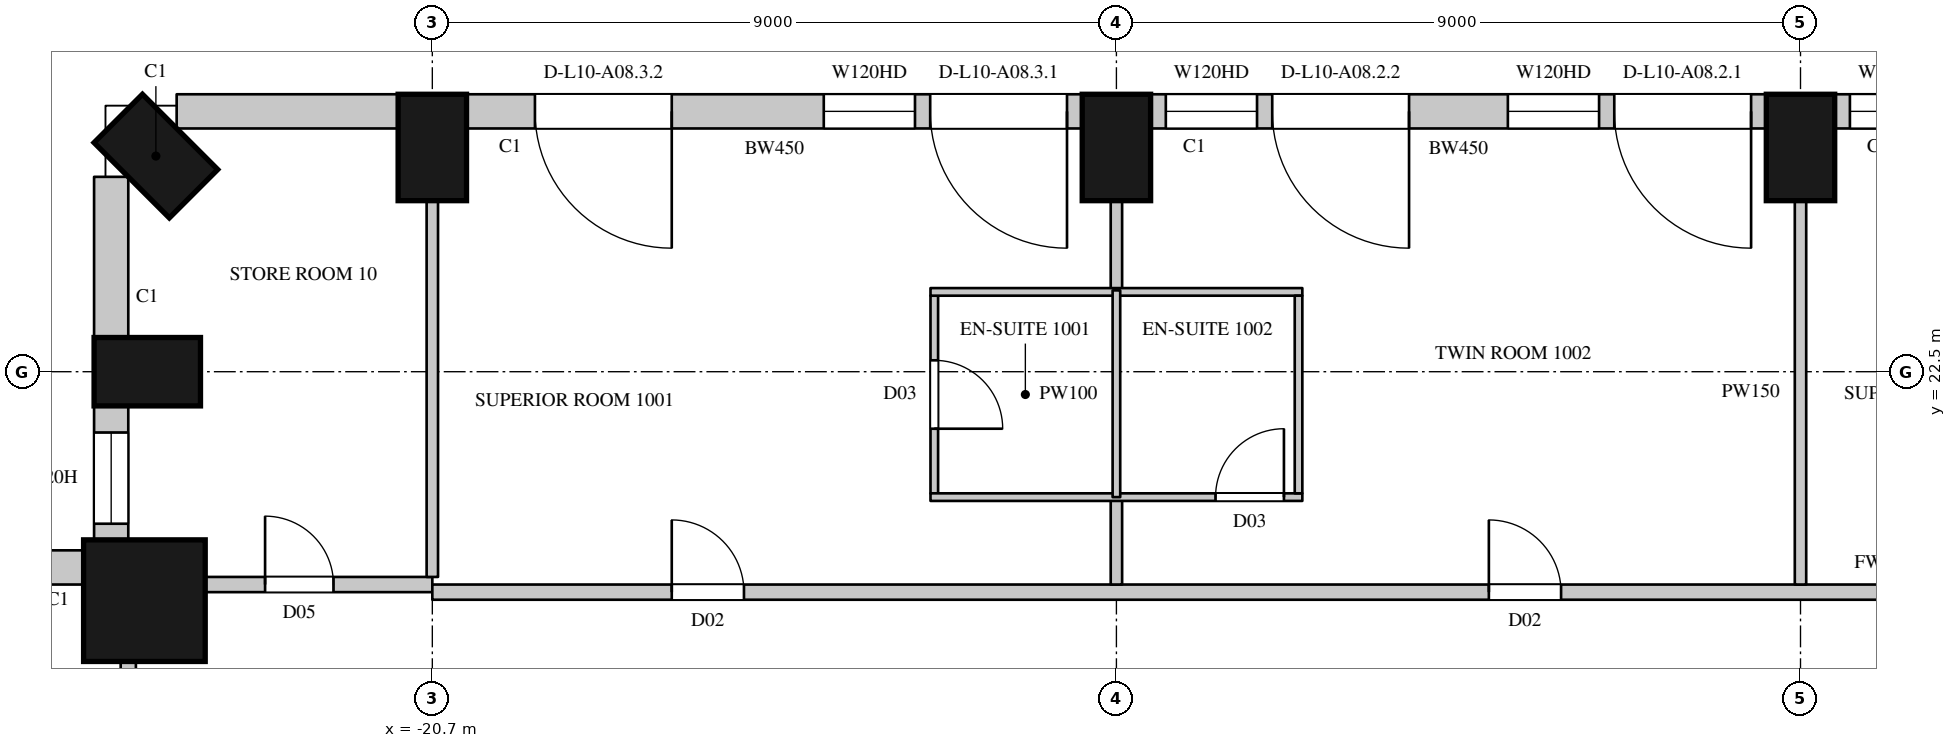
"""IFC4 building model, lengths in metres.
Left out: names, types, materials, properties, quantities, classifications, styles, units other than length and angle.
Written with IfcOpenShell. Run it as: python <this file> out.ifc"""

import sys

from ifc_helpers import new_model, si_unit, direction, frame, frame_2d, origin, origin_2d, place, context, subcontext, project, spatial, rectangle, circle, extrude, element, fill, save


model = new_model("IFC4")
c1 = context("Model", 3, precision=1e-05, world=origin(), true_north=direction((0.0, 1.0)))
c2 = subcontext(c1, "Body", "Model", "MODEL_VIEW")
j1 = project(units=[si_unit("LENGTHUNIT", "METRE"), si_unit("PLANEANGLEUNIT", "RADIAN")], contexts=[c1])
p1 = place(None, origin())
s1 = spatial("IfcSite", under=j1, at=p1, CompositionType="ELEMENT")
p2 = place(p1, origin())
s2 = spatial("IfcBuilding", under=s1, at=p2, CompositionType="ELEMENT")
p3 = place(p2, frame((0.0, 0.0, 66.3)))
s3 = spatial("IfcBuildingStorey", under=s2, at=p3, CompositionType="ELEMENT", Elevation=66.3)
for number, where, z_axis, x_axis in (
    (1, (-2.7, 25.45, 0.0), (0.0, 0.0, 1.0), (-1.0, 0.0, 0.0)),
    (2, (-11.7, 25.45, 0.0), (0.0, 0.0, 1.0), (-1.0, 0.0, 0.0)),
    (3, (-20.7, 25.45, 0.0), (0.0, 0.0, 1.0), (-1.0, 0.0, 0.0)),
    (4, (-24.337, 25.337, 0.0), (0.0, 0.0, 1.0), (-0.707, -0.707, 0.0)),
    (5, (-24.45, 22.5, 0.0), (0.0, 0.0, 1.0), (0.0, -1.0, 0.0)),
):
    element("IfcColumn", number, at=place(p3, frame(where, z_axis=z_axis, x_axis=x_axis)), inside=s3, PredefinedType="COLUMN", context=c2, shape_type="SweptSolid", body=[
        extrude(rectangle(XDim=0.9, YDim=1.4, at=origin_2d()), origin(), (0.0, 0.0, 1.0), 3.6),
    ])
p4 = place(p3, frame((-24.488, 19.488, 0.0), z_axis=(0.0, 0.0, 1.0), x_axis=(1.0, 0.0, 0.0)))
e6 = element("IfcColumn", 6, at=p4, inside=s3, PredefinedType="COLUMN", context=c2, shape_type="SweptSolid", body=[
    extrude(circle(Radius=0.8, at=origin_2d()), origin(), (0.0, 0.0, 1.0), 3.6),
])
p5 = place(p3, frame((5.85, 25.925, 0.0), z_axis=(0.0, 0.0, 1.0), x_axis=(-1.0, 0.0, 0.0)))
e7 = element("IfcWall", 7, at=p5, inside=s3, PredefinedType="SOLIDWALL", context=c2, shape_type="SweptSolid", body=[
    extrude(rectangle(XDim=8.1, YDim=0.45, at=frame_2d((4.05, 0.0))), origin(), (0.0, 0.0, 1.0), 3.3),
])
p6 = place(p5, frame((0.2, 0.0, 0.0)))
e8 = element("IfcOpeningElement", 8, at=p6, cuts=e7, PredefinedType="OPENING", context=c2, shape_type="SweptSolid", body=[
    extrude(rectangle(XDim=1.8, YDim=2.4, at=frame_2d((0.9, 1.2))), frame((0.0, 0.235, 0.0), z_axis=(0.0, -1.0, 0.0), x_axis=(1.0, 0.0, 0.0)), (0.0, 0.0, 1.0), 0.47),
])
p7 = place(p5, frame((2.2, 0.0, 1.05)))
e9 = element("IfcOpeningElement", 9, at=p7, cuts=e7, PredefinedType="OPENING", context=c2, shape_type="SweptSolid", body=[
    extrude(rectangle(XDim=1.2, YDim=2.0, at=frame_2d((0.6, 1.0))), frame((0.0, 0.235, 0.0), z_axis=(0.0, -1.0, 0.0), x_axis=(1.0, 0.0, 0.0)), (0.0, 0.0, 1.0), 0.47),
])
p8 = place(p5, frame((4.7, 0.0, 0.0)))
e10 = element("IfcOpeningElement", 10, at=p8, cuts=e7, PredefinedType="OPENING", context=c2, shape_type="SweptSolid", body=[
    extrude(rectangle(XDim=1.8, YDim=2.4, at=frame_2d((0.9, 1.2))), frame((0.0, 0.235, 0.0), z_axis=(0.0, -1.0, 0.0), x_axis=(1.0, 0.0, 0.0)), (0.0, 0.0, 1.0), 0.47),
])
p9 = place(p5, frame((6.7, 0.0, 1.05)))
e11 = element("IfcOpeningElement", 11, at=p9, cuts=e7, PredefinedType="OPENING", context=c2, shape_type="SweptSolid", body=[
    extrude(rectangle(XDim=1.2, YDim=2.0, at=frame_2d((0.6, 1.0))), frame((0.0, 0.235, 0.0), z_axis=(0.0, -1.0, 0.0), x_axis=(1.0, 0.0, 0.0)), (0.0, 0.0, 1.0), 0.47),
])
p10 = place(p3, frame((-3.15, 25.925, 0.0), z_axis=(0.0, 0.0, 1.0), x_axis=(-1.0, 0.0, 0.0)))
e12 = element("IfcWall", 12, at=p10, inside=s3, PredefinedType="SOLIDWALL", context=c2, shape_type="SweptSolid", body=[
    extrude(rectangle(XDim=8.1, YDim=0.45, at=frame_2d((4.05, 0.0))), origin(), (0.0, 0.0, 1.0), 3.3),
])
p11 = place(p10, frame((0.2, 0.0, 0.0)))
e13 = element("IfcOpeningElement", 13, at=p11, cuts=e12, PredefinedType="OPENING", context=c2, shape_type="SweptSolid", body=[
    extrude(rectangle(XDim=1.8, YDim=2.4, at=frame_2d((0.9, 1.2))), frame((0.0, 0.235, 0.0), z_axis=(0.0, -1.0, 0.0), x_axis=(1.0, 0.0, 0.0)), (0.0, 0.0, 1.0), 0.47),
])
p12 = place(p10, frame((2.2, 0.0, 1.05)))
e14 = element("IfcOpeningElement", 14, at=p12, cuts=e12, PredefinedType="OPENING", context=c2, shape_type="SweptSolid", body=[
    extrude(rectangle(XDim=1.2, YDim=2.0, at=frame_2d((0.6, 1.0))), frame((0.0, 0.235, 0.0), z_axis=(0.0, -1.0, 0.0), x_axis=(1.0, 0.0, 0.0)), (0.0, 0.0, 1.0), 0.47),
])
p13 = place(p10, frame((4.7, 0.0, 0.0)))
e15 = element("IfcOpeningElement", 15, at=p13, cuts=e12, PredefinedType="OPENING", context=c2, shape_type="SweptSolid", body=[
    extrude(rectangle(XDim=1.8, YDim=2.4, at=frame_2d((0.9, 1.2))), frame((0.0, 0.235, 0.0), z_axis=(0.0, -1.0, 0.0), x_axis=(1.0, 0.0, 0.0)), (0.0, 0.0, 1.0), 0.47),
])
p14 = place(p10, frame((6.7, 0.0, 1.05)))
e16 = element("IfcOpeningElement", 16, at=p14, cuts=e12, PredefinedType="OPENING", context=c2, shape_type="SweptSolid", body=[
    extrude(rectangle(XDim=1.2, YDim=2.0, at=frame_2d((0.6, 1.0))), frame((0.0, 0.235, 0.0), z_axis=(0.0, -1.0, 0.0), x_axis=(1.0, 0.0, 0.0)), (0.0, 0.0, 1.0), 0.47),
])
p15 = place(p3, frame((-12.15, 25.925, 0.0), z_axis=(0.0, 0.0, 1.0), x_axis=(-1.0, 0.0, 0.0)))
e17 = element("IfcWall", 17, at=p15, inside=s3, PredefinedType="SOLIDWALL", context=c2, shape_type="SweptSolid", body=[
    extrude(rectangle(XDim=8.1, YDim=0.45, at=frame_2d((4.05, 0.0))), origin(), (0.0, 0.0, 1.0), 3.3),
])
p16 = place(p15, frame((0.2, 0.0, 0.0)))
e18 = element("IfcOpeningElement", 18, at=p16, cuts=e17, PredefinedType="OPENING", context=c2, shape_type="SweptSolid", body=[
    extrude(rectangle(XDim=1.8, YDim=2.4, at=frame_2d((0.9, 1.2))), frame((0.0, 0.235, 0.0), z_axis=(0.0, -1.0, 0.0), x_axis=(1.0, 0.0, 0.0)), (0.0, 0.0, 1.0), 0.47),
])
p17 = place(p15, frame((2.2, 0.0, 1.05)))
e19 = element("IfcOpeningElement", 19, at=p17, cuts=e17, PredefinedType="OPENING", context=c2, shape_type="SweptSolid", body=[
    extrude(rectangle(XDim=1.2, YDim=2.0, at=frame_2d((0.6, 1.0))), frame((0.0, 0.235, 0.0), z_axis=(0.0, -1.0, 0.0), x_axis=(1.0, 0.0, 0.0)), (0.0, 0.0, 1.0), 0.47),
])
p18 = place(p15, frame((5.4, 0.0, 0.0)))
e20 = element("IfcOpeningElement", 20, at=p18, cuts=e17, PredefinedType="OPENING", context=c2, shape_type="SweptSolid", body=[
    extrude(rectangle(XDim=1.8, YDim=2.4, at=frame_2d((0.9, 1.2))), frame((0.0, 0.235, 0.0), z_axis=(0.0, -1.0, 0.0), x_axis=(1.0, 0.0, 0.0)), (0.0, 0.0, 1.0), 0.47),
])
p19 = place(p3, frame((-21.15, 25.925, 0.0), z_axis=(0.0, 0.0, 1.0), x_axis=(-1.0, 0.0, 0.0)))
e21 = element("IfcWall", 21, at=p19, inside=s3, PredefinedType="SOLIDWALL", context=c2, shape_type="SweptSolid", body=[
    extrude(rectangle(XDim=2.914, YDim=0.45, at=frame_2d((1.457, 0.0))), origin(), (0.0, 0.0, 1.0), 3.3),
])
p20 = place(p3, frame((-24.925, 25.064, 0.0), z_axis=(0.0, 0.0, 1.0), x_axis=(0.0, -1.0, 0.0)))
e22 = element("IfcWall", 22, at=p20, inside=s3, PredefinedType="SOLIDWALL", context=c2, shape_type="SweptSolid", body=[
    extrude(rectangle(XDim=2.114, YDim=0.45, at=frame_2d((1.057, 0.0))), origin(), (0.0, 0.0, 1.0), 3.3),
])
p21 = place(p3, frame((-24.925, 22.05, 0.0), z_axis=(0.0, 0.0, 1.0), x_axis=(0.0, -1.0, 0.0)))
e23 = element("IfcWall", 23, at=p21, inside=s3, PredefinedType="SOLIDWALL", context=c2, shape_type="SweptSolid", body=[
    extrude(rectangle(XDim=1.792, YDim=0.45, at=frame_2d((0.896, 0.0))), origin(), (0.0, 0.0, 1.0), 3.3),
])
p22 = place(p21, frame((0.35, 0.0, 1.05)))
e24 = element("IfcOpeningElement", 24, at=p22, cuts=e23, PredefinedType="OPENING", context=c2, shape_type="SweptSolid", body=[
    extrude(rectangle(XDim=1.2, YDim=2.0, at=frame_2d((0.6, 1.0))), frame((0.0, 0.235, 0.0), z_axis=(0.0, -1.0, 0.0), x_axis=(1.0, 0.0, 0.0)), (0.0, 0.0, 1.0), 0.47),
])
p23 = place(p3, frame((-25.259, 19.925, 0.0), z_axis=(0.0, 0.0, 1.0), x_axis=(-1.0, 0.0, 0.0)))
e25 = element("IfcWall", 25, at=p23, inside=s3, PredefinedType="SOLIDWALL", context=c2, shape_type="SweptSolid", body=[
    extrude(rectangle(XDim=3.805, YDim=0.45, at=frame_2d((1.903, 0.0))), origin(), (0.0, 0.0, 1.0), 3.3),
])
p24 = place(p23, frame((0.592, 0.0, 1.05)))
e26 = element("IfcOpeningElement", 26, at=p24, cuts=e25, PredefinedType="OPENING", context=c2, shape_type="SweptSolid", body=[
    extrude(rectangle(XDim=2.7, YDim=2.0, at=frame_2d((1.35, 1.0))), frame((0.0, 0.235, 0.0), z_axis=(0.0, -1.0, 0.0), x_axis=(1.0, 0.0, 0.0)), (0.0, 0.0, 1.0), 0.47),
])
p25 = place(p3, frame((-24.7, 16.03, 0.0), z_axis=(0.0, 0.0, 1.0), x_axis=(0.0, 1.0, 0.0)))
e27 = element("IfcWall", 27, at=p25, inside=s3, PredefinedType="PARTITIONING", context=c2, shape_type="SweptSolid", body=[
    extrude(rectangle(XDim=2.67, YDim=0.2, at=frame_2d((1.335, 0.0))), origin(), (0.0, 0.0, 1.0), 3.3),
])
p26 = place(p25, frame((0.45, 0.0, 0.0)))
e28 = element("IfcOpeningElement", 28, at=p26, cuts=e27, PredefinedType="OPENING", context=c2, shape_type="SweptSolid", body=[
    extrude(rectangle(XDim=1.6, YDim=2.4, at=frame_2d((0.8, 1.2))), frame((0.0, 0.11, 0.0), z_axis=(0.0, -1.0, 0.0), x_axis=(1.0, 0.0, 0.0)), (0.0, 0.0, 1.0), 0.22),
])
p27 = place(p3, frame((-23.7, 19.7, 0.0), z_axis=(0.0, 0.0, 1.0), x_axis=(1.0, 0.0, 0.0)))
e29 = element("IfcWall", 29, at=p27, inside=s3, PredefinedType="PARTITIONING", context=c2, shape_type="SweptSolid", body=[
    extrude(rectangle(XDim=3.0, YDim=0.2, at=frame_2d((1.5, 0.0))), origin(), (0.0, 0.0, 1.0), 3.3),
])
p28 = place(p27, frame((0.8, 0.0, 0.0)))
e30 = element("IfcOpeningElement", 30, at=p28, cuts=e29, PredefinedType="OPENING", context=c2, shape_type="SweptSolid", body=[
    extrude(rectangle(XDim=0.9, YDim=2.2, at=frame_2d((0.45, 1.1))), frame((0.0, 0.11, 0.0), z_axis=(0.0, -1.0, 0.0), x_axis=(1.0, 0.0, 0.0)), (0.0, 0.0, 1.0), 0.22),
])
p29 = place(p3, frame((-20.7, 19.6, 0.0), z_axis=(0.0, 0.0, 1.0), x_axis=(1.0, 0.0, 0.0)))
e31 = element("IfcWall", 31, at=p29, inside=s3, PredefinedType="PARTITIONING", context=c2, shape_type="SweptSolid", body=[
    extrude(rectangle(XDim=38.184, YDim=0.2, at=frame_2d((19.092, 0.0))), origin(), (0.0, 0.0, 1.0), 3.3),
])
p30 = place(p29, frame((3.15, 0.0, 0.0)))
e32 = element("IfcOpeningElement", 32, at=p30, cuts=e31, PredefinedType="OPENING", context=c2, shape_type="SweptSolid", body=[
    extrude(rectangle(XDim=0.95, YDim=2.2, at=frame_2d((0.475, 1.1))), frame((0.0, 0.11, 0.0), z_axis=(0.0, -1.0, 0.0), x_axis=(1.0, 0.0, 0.0)), (0.0, 0.0, 1.0), 0.22),
])
p31 = place(p29, frame((13.9, 0.0, 0.0)))
e33 = element("IfcOpeningElement", 33, at=p31, cuts=e31, PredefinedType="OPENING", context=c2, shape_type="SweptSolid", body=[
    extrude(rectangle(XDim=0.95, YDim=2.2, at=frame_2d((0.475, 1.1))), frame((0.0, 0.11, 0.0), z_axis=(0.0, -1.0, 0.0), x_axis=(1.0, 0.0, 0.0)), (0.0, 0.0, 1.0), 0.22),
])
p32 = place(p29, frame((21.15, 0.0, 0.0)))
e34 = element("IfcOpeningElement", 34, at=p32, cuts=e31, PredefinedType="OPENING", context=c2, shape_type="SweptSolid", body=[
    extrude(rectangle(XDim=0.95, YDim=2.2, at=frame_2d((0.475, 1.1))), frame((0.0, 0.11, 0.0), z_axis=(0.0, -1.0, 0.0), x_axis=(1.0, 0.0, 0.0)), (0.0, 0.0, 1.0), 0.22),
])
p33 = place(p29, frame((31.9, 0.0, 0.0)))
e35 = element("IfcOpeningElement", 35, at=p33, cuts=e31, PredefinedType="OPENING", context=c2, shape_type="SweptSolid", body=[
    extrude(rectangle(XDim=0.95, YDim=2.2, at=frame_2d((0.475, 1.1))), frame((0.0, 0.11, 0.0), z_axis=(0.0, -1.0, 0.0), x_axis=(1.0, 0.0, 0.0)), (0.0, 0.0, 1.0), 0.22),
])
p34 = place(p29, frame((36.85, 0.0, 0.0)))
e36 = element("IfcOpeningElement", 36, at=p34, cuts=e31, PredefinedType="OPENING", context=c2, shape_type="SweptSolid", body=[
    extrude(rectangle(XDim=0.95, YDim=2.2, at=frame_2d((0.475, 1.1))), frame((0.0, 0.11, 0.0), z_axis=(0.0, -1.0, 0.0), x_axis=(1.0, 0.0, 0.0)), (0.0, 0.0, 1.0), 0.22),
])
p35 = place(p3, frame((-20.7, 19.8, 0.0), z_axis=(0.0, 0.0, 1.0), x_axis=(0.0, 1.0, 0.0)))
e37 = element("IfcWall", 37, at=p35, inside=s3, PredefinedType="PARTITIONING", context=c2, shape_type="SweptSolid", body=[
    extrude(rectangle(XDim=4.95, YDim=0.15, at=frame_2d((2.475, 0.0))), origin(), (0.0, 0.0, 1.0), 2.75),
])
p36 = place(p3, frame((-11.7, 19.7, 0.0), z_axis=(0.0, 0.0, 1.0), x_axis=(0.0, 1.0, 0.0)))
e38 = element("IfcWall", 38, at=p36, inside=s3, PredefinedType="PARTITIONING", context=c2, shape_type="SweptSolid", body=[
    extrude(rectangle(XDim=1.15, YDim=0.15, at=frame_2d((0.575, 0.0))), origin(), (0.0, 0.0, 1.0), 2.75),
])
p37 = place(p3, frame((-11.7, 23.57, 0.0), z_axis=(0.0, 0.0, 1.0), x_axis=(0.0, 1.0, 0.0)))
e39 = element("IfcWall", 39, at=p37, inside=s3, PredefinedType="PARTITIONING", context=c2, shape_type="SweptSolid", body=[
    extrude(rectangle(XDim=1.18, YDim=0.15, at=frame_2d((0.59, 0.0))), origin(), (0.0, 0.0, 1.0), 2.75),
])
p38 = place(p3, frame((-2.7, 19.7, 0.0), z_axis=(0.0, 0.0, 1.0), x_axis=(0.0, 1.0, 0.0)))
e40 = element("IfcWall", 40, at=p38, inside=s3, PredefinedType="PARTITIONING", context=c2, shape_type="SweptSolid", body=[
    extrude(rectangle(XDim=5.05, YDim=0.15, at=frame_2d((2.525, 0.0))), origin(), (0.0, 0.0, 1.0), 2.75),
])
p39 = place(p3, frame((-14.096, 20.9, 0.0), z_axis=(0.0, 0.0, 1.0), x_axis=(0.0, 1.0, 0.0)))
e41 = element("IfcWall", 41, at=p39, inside=s3, PredefinedType="PARTITIONING", context=c2, shape_type="SweptSolid", body=[
    extrude(rectangle(XDim=2.6, YDim=0.1, at=frame_2d((1.3, 0.0))), origin(), (0.0, 0.0, 1.0), 3.3),
])
p40 = place(p39, frame((0.85, 0.0, 0.0)))
e42 = element("IfcOpeningElement", 42, at=p40, cuts=e41, PredefinedType="OPENING", context=c2, shape_type="SweptSolid", body=[
    extrude(rectangle(XDim=0.9, YDim=2.2, at=frame_2d((0.45, 1.1))), frame((0.0, 0.06, 0.0), z_axis=(0.0, -1.0, 0.0), x_axis=(1.0, 0.0, 0.0)), (0.0, 0.0, 1.0), 0.12),
])
p41 = place(p3, frame((-14.146, 20.85, 0.0), z_axis=(0.0, 0.0, 1.0), x_axis=(1.0, 0.0, 0.0)))
e43 = element("IfcWall", 43, at=p41, inside=s3, PredefinedType="PARTITIONING", context=c2, shape_type="SweptSolid", body=[
    extrude(rectangle(XDim=4.892, YDim=0.1, at=frame_2d((2.446, 0.0))), origin(), (0.0, 0.0, 1.0), 3.3),
])
p42 = place(p41, frame((3.75, 0.0, 0.0)))
e44 = element("IfcOpeningElement", 44, at=p42, cuts=e43, PredefinedType="OPENING", context=c2, shape_type="SweptSolid", body=[
    extrude(rectangle(XDim=0.9, YDim=2.2, at=frame_2d((0.45, 1.1))), frame((0.0, 0.06, 0.0), z_axis=(0.0, -1.0, 0.0), x_axis=(1.0, 0.0, 0.0)), (0.0, 0.0, 1.0), 0.12),
])
p43 = place(p3, frame((-14.146, 23.55, 0.0), z_axis=(0.0, 0.0, 1.0), x_axis=(1.0, 0.0, 0.0)))
e45 = element("IfcWall", 45, at=p43, inside=s3, PredefinedType="PARTITIONING", context=c2, shape_type="SweptSolid", body=[
    extrude(rectangle(XDim=4.892, YDim=0.1, at=frame_2d((2.446, 0.0))), origin(), (0.0, 0.0, 1.0), 3.3),
])
p44 = place(p3, frame((-11.7, 20.85, 0.0), z_axis=(0.0, 0.0, 1.0), x_axis=(0.0, 1.0, 0.0)))
e46 = element("IfcWall", 46, at=p44, inside=s3, PredefinedType="PARTITIONING", context=c2, shape_type="SweptSolid", body=[
    extrude(rectangle(XDim=2.72, YDim=0.1, at=frame_2d((1.36, 0.0))), origin(), (0.0, 0.0, 1.0), 2.75),
])
p45 = place(p3, frame((-9.304, 20.9, 0.0), z_axis=(0.0, 0.0, 1.0), x_axis=(0.0, 1.0, 0.0)))
e47 = element("IfcWall", 47, at=p45, inside=s3, PredefinedType="PARTITIONING", context=c2, shape_type="SweptSolid", body=[
    extrude(rectangle(XDim=2.6, YDim=0.1, at=frame_2d((1.3, 0.0))), origin(), (0.0, 0.0, 1.0), 3.3),
])
p46 = place(p9, origin())
e48 = element("IfcWindow", 48, at=p46, inside=s3, PartitioningType="SINGLE_PANEL", PredefinedType="WINDOW", context=c2, shape_type="SweptSolid", body=[
    extrude(rectangle(XDim=1.2, YDim=2.0, at=frame_2d((0.6, 1.0))), frame((0.0, 0.135, 0.0), z_axis=(0.0, -1.0, 0.0), x_axis=(1.0, 0.0, 0.0)), (0.0, 0.0, 1.0), 0.06),
])
fill(e11, e48)
p47 = place(p11, origin())
e49 = element("IfcDoor", 49, at=p47, inside=s3, OperationType="SLIDING_TO_LEFT", PredefinedType="DOOR", context=c2, shape_type="SweptSolid", body=[
    extrude(rectangle(XDim=1.8, YDim=2.4, at=frame_2d((0.9, 1.2))), frame((0.0, 0.13, 0.0), z_axis=(0.0, -1.0, 0.0), x_axis=(1.0, 0.0, 0.0)), (0.0, 0.0, 1.0), 0.05),
])
fill(e13, e49)
p48 = place(p12, origin())
e50 = element("IfcWindow", 50, at=p48, inside=s3, PartitioningType="SINGLE_PANEL", PredefinedType="WINDOW", context=c2, shape_type="SweptSolid", body=[
    extrude(rectangle(XDim=1.2, YDim=2.0, at=frame_2d((0.6, 1.0))), frame((0.0, 0.135, 0.0), z_axis=(0.0, -1.0, 0.0), x_axis=(1.0, 0.0, 0.0)), (0.0, 0.0, 1.0), 0.06),
])
fill(e14, e50)
p49 = place(p13, origin())
e51 = element("IfcDoor", 51, at=p49, inside=s3, OperationType="SLIDING_TO_LEFT", PredefinedType="DOOR", context=c2, shape_type="SweptSolid", body=[
    extrude(rectangle(XDim=1.8, YDim=2.4, at=frame_2d((0.9, 1.2))), frame((0.0, 0.13, 0.0), z_axis=(0.0, -1.0, 0.0), x_axis=(1.0, 0.0, 0.0)), (0.0, 0.0, 1.0), 0.05),
])
fill(e15, e51)
p50 = place(p14, origin())
e52 = element("IfcWindow", 52, at=p50, inside=s3, PartitioningType="SINGLE_PANEL", PredefinedType="WINDOW", context=c2, shape_type="SweptSolid", body=[
    extrude(rectangle(XDim=1.2, YDim=2.0, at=frame_2d((0.6, 1.0))), frame((0.0, 0.135, 0.0), z_axis=(0.0, -1.0, 0.0), x_axis=(1.0, 0.0, 0.0)), (0.0, 0.0, 1.0), 0.06),
])
fill(e16, e52)
p51 = place(p16, origin())
e53 = element("IfcDoor", 53, at=p51, inside=s3, OperationType="SLIDING_TO_LEFT", PredefinedType="DOOR", context=c2, shape_type="SweptSolid", body=[
    extrude(rectangle(XDim=1.8, YDim=2.4, at=frame_2d((0.9, 1.2))), frame((0.0, 0.13, 0.0), z_axis=(0.0, -1.0, 0.0), x_axis=(1.0, 0.0, 0.0)), (0.0, 0.0, 1.0), 0.05),
])
fill(e18, e53)
p52 = place(p17, origin())
e54 = element("IfcWindow", 54, at=p52, inside=s3, PartitioningType="SINGLE_PANEL", PredefinedType="WINDOW", context=c2, shape_type="SweptSolid", body=[
    extrude(rectangle(XDim=1.2, YDim=2.0, at=frame_2d((0.6, 1.0))), frame((0.0, 0.135, 0.0), z_axis=(0.0, -1.0, 0.0), x_axis=(1.0, 0.0, 0.0)), (0.0, 0.0, 1.0), 0.06),
])
fill(e19, e54)
p53 = place(p18, origin())
e55 = element("IfcDoor", 55, at=p53, inside=s3, OperationType="SLIDING_TO_LEFT", PredefinedType="DOOR", context=c2, shape_type="SweptSolid", body=[
    extrude(rectangle(XDim=1.8, YDim=2.4, at=frame_2d((0.9, 1.2))), frame((0.0, 0.13, 0.0), z_axis=(0.0, -1.0, 0.0), x_axis=(1.0, 0.0, 0.0)), (0.0, 0.0, 1.0), 0.05),
])
fill(e20, e55)
p54 = place(p22, origin())
e56 = element("IfcWindow", 56, at=p54, inside=s3, PartitioningType="SINGLE_PANEL", PredefinedType="WINDOW", context=c2, shape_type="SweptSolid", body=[
    extrude(rectangle(XDim=1.2, YDim=2.0, at=frame_2d((0.6, 1.0))), frame((0.0, 0.135, 0.0), z_axis=(0.0, -1.0, 0.0), x_axis=(1.0, 0.0, 0.0)), (0.0, 0.0, 1.0), 0.06),
])
fill(e24, e56)
p55 = place(p28, origin())
e57 = element("IfcDoor", 57, at=p55, inside=s3, OperationType="SINGLE_SWING_LEFT", PredefinedType="DOOR", context=c2, shape_type="SweptSolid", body=[
    extrude(rectangle(XDim=0.9, YDim=2.2, at=frame_2d((0.45, 1.1))), frame((0.0, 0.025, 0.0), z_axis=(0.0, -1.0, 0.0), x_axis=(1.0, 0.0, 0.0)), (0.0, 0.0, 1.0), 0.05),
])
fill(e30, e57)
p56 = place(p30, origin())
e58 = element("IfcDoor", 58, at=p56, inside=s3, OperationType="SINGLE_SWING_LEFT", PredefinedType="DOOR", context=c2, shape_type="SweptSolid", body=[
    extrude(rectangle(XDim=0.95, YDim=2.2, at=frame_2d((0.475, 1.1))), frame((0.0, 0.025, 0.0), z_axis=(0.0, -1.0, 0.0), x_axis=(1.0, 0.0, 0.0)), (0.0, 0.0, 1.0), 0.05),
])
fill(e32, e58)
p57 = place(p40, origin())
e59 = element("IfcDoor", 59, at=p57, inside=s3, OperationType="SINGLE_SWING_RIGHT", PredefinedType="DOOR", context=c2, shape_type="SweptSolid", body=[
    extrude(rectangle(XDim=0.9, YDim=2.2, at=frame_2d((0.45, 1.1))), frame((0.0, 0.025, 0.0), z_axis=(0.0, -1.0, 0.0), x_axis=(1.0, 0.0, 0.0)), (0.0, 0.0, 1.0), 0.05),
])
fill(e42, e59)
p58 = place(p31, origin())
e60 = element("IfcDoor", 60, at=p58, inside=s3, OperationType="SINGLE_SWING_LEFT", PredefinedType="DOOR", context=c2, shape_type="SweptSolid", body=[
    extrude(rectangle(XDim=0.95, YDim=2.2, at=frame_2d((0.475, 1.1))), frame((0.0, 0.025, 0.0), z_axis=(0.0, -1.0, 0.0), x_axis=(1.0, 0.0, 0.0)), (0.0, 0.0, 1.0), 0.05),
])
fill(e33, e60)
p59 = place(p42, origin())
e61 = element("IfcDoor", 61, at=p59, inside=s3, OperationType="SINGLE_SWING_RIGHT", PredefinedType="DOOR", context=c2, shape_type="SweptSolid", body=[
    extrude(rectangle(XDim=0.9, YDim=2.2, at=frame_2d((0.45, 1.1))), frame((0.0, 0.025, 0.0), z_axis=(0.0, -1.0, 0.0), x_axis=(1.0, 0.0, 0.0)), (0.0, 0.0, 1.0), 0.05),
])
fill(e44, e61)
save(model, sys.argv[1])
